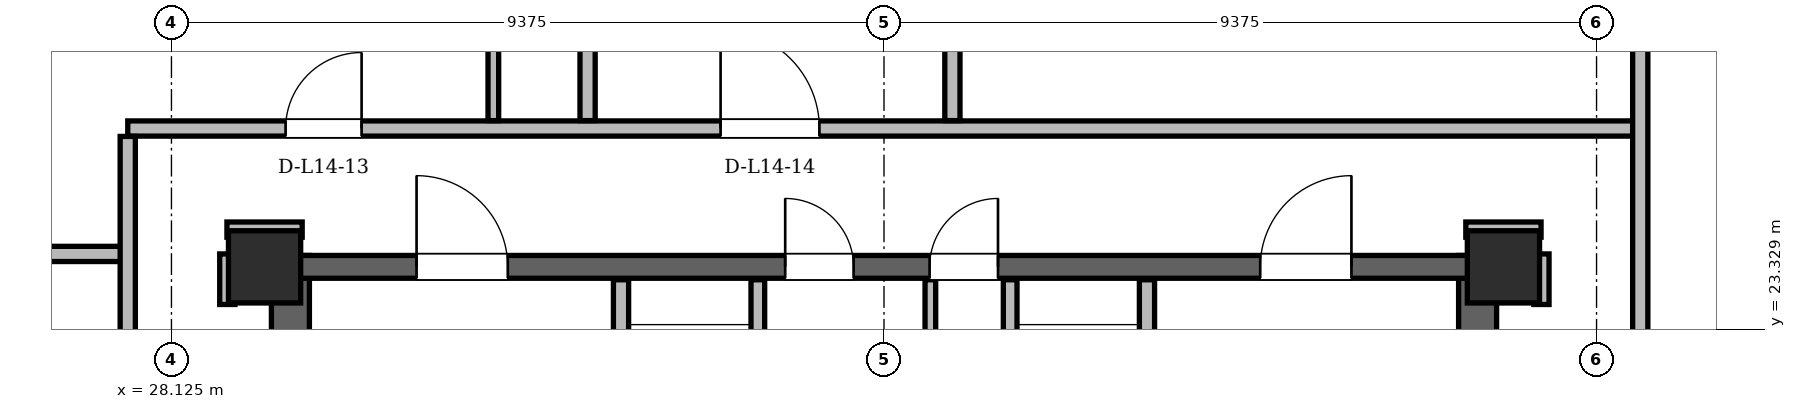
"""IFC4 building model, lengths in metres.
Left out: names, types, materials, properties, quantities, classifications, styles, units other than length and angle.
Written with IfcOpenShell. Run it as: python <this file> out.ifc"""

import sys

from ifc_helpers import new_model, si_unit, direction, frame, frame_2d, origin, origin_2d, place, context, subcontext, project, spatial, rectangle, hollow_rectangle, extrude, element, fill, save


model = new_model("IFC4")
c1 = context("Model", 3, precision=1e-05, world=origin(), true_north=direction((0.0, 1.0)))
c2 = subcontext(c1, "Body", "Model", "MODEL_VIEW")
j1 = project(units=[si_unit("LENGTHUNIT", "METRE"), si_unit("PLANEANGLEUNIT", "RADIAN")], contexts=[c1])
p1 = place(None, origin())
s1 = spatial("IfcSite", under=j1, at=p1, CompositionType="ELEMENT")
p2 = place(p1, origin())
s2 = spatial("IfcBuilding", under=s1, at=p2, CompositionType="ELEMENT")
p3 = place(p2, frame((0.0, 0.0, 56.1)))
s3 = spatial("IfcBuildingStorey", under=s2, at=p3, CompositionType="ELEMENT", Elevation=56.1)
for number, where, z_axis, x_axis in (
    (1, (45.65, 24.15, 0.0), (0.0, 0.0, 1.0), (1.0, 0.0, 0.0)),
    (2, (29.35, 24.15, 0.0), (0.0, 0.0, 1.0), (1.0, 0.0, 0.0)),
):
    element("IfcColumn", number, at=place(p3, frame(where, z_axis=z_axis, x_axis=x_axis)), inside=s3, PredefinedType="COLUMN", context=c2, shape_type="SweptSolid", body=[
        extrude(hollow_rectangle(XDim=0.95, YDim=0.95, WallThickness=0.08, at=origin_2d()), origin(), (0.0, 0.0, 1.0), 3.6),
    ])
for number, where, z_axis, x_axis in (
    (3, (29.69, 11.0, 0.0), (0.0, 0.0, 1.0), (0.0, 1.0, 0.0)),
    (4, (45.31, 11.0, 0.0), (0.0, 0.0, 1.0), (0.0, 1.0, 0.0)),
):
    element("IfcWall", number, at=place(p3, frame(where, z_axis=z_axis, x_axis=x_axis)), inside=s3, PredefinedType="SHEAR", context=c2, shape_type="SweptSolid", body=[
        extrude(rectangle(XDim=13.3, YDim=0.5, at=frame_2d((6.65, 0.0))), origin(), (0.0, 0.0, 1.0), 3.36),
    ])
p4 = place(p3, frame((29.65, 24.15, 0.0), z_axis=(0.0, 0.0, 1.0), x_axis=(1.0, 0.0, 0.0)))
e5 = element("IfcWall", 5, at=p4, inside=s3, PredefinedType="SHEAR", context=c2, shape_type="SweptSolid", body=[
    extrude(rectangle(XDim=15.7, YDim=0.3, at=frame_2d((7.85, 0.0))), origin(), (0.0, 0.0, 1.0), 3.36),
])
p5 = place(p4, frame((1.7, 0.0, 0.0)))
e6 = element("IfcOpeningElement", 6, at=p5, cuts=e5, PredefinedType="OPENING", context=c2, shape_type="SweptSolid", body=[
    extrude(rectangle(XDim=1.2, YDim=2.2, at=frame_2d((0.6, 1.1))), frame((0.0, 0.15, 0.0), z_axis=(0.0, -1.0, 0.0), x_axis=(1.0, 0.0, 0.0)), (0.0, 0.0, 1.0), 0.3),
])
p6 = place(p4, frame((12.8, 0.0, 0.0)))
e7 = element("IfcOpeningElement", 7, at=p6, cuts=e5, PredefinedType="OPENING", context=c2, shape_type="SweptSolid", body=[
    extrude(rectangle(XDim=1.2, YDim=2.2, at=frame_2d((0.6, 1.1))), frame((0.0, 0.15, 0.0), z_axis=(0.0, -1.0, 0.0), x_axis=(1.0, 0.0, 0.0)), (0.0, 0.0, 1.0), 0.3),
])
p7 = place(p4, frame((6.55, 0.0, 0.0)))
e8 = element("IfcOpeningElement", 8, at=p7, cuts=e5, PredefinedType="OPENING", context=c2, shape_type="SweptSolid", body=[
    extrude(rectangle(XDim=0.9, YDim=2.05, at=frame_2d((0.45, 1.025))), frame((0.0, 0.15, 0.0), z_axis=(0.0, -1.0, 0.0), x_axis=(1.0, 0.0, 0.0)), (0.0, 0.0, 1.0), 0.3),
])
p8 = place(p4, frame((8.45, 0.0, 0.0)))
e9 = element("IfcOpeningElement", 9, at=p8, cuts=e5, PredefinedType="OPENING", context=c2, shape_type="SweptSolid", body=[
    extrude(rectangle(XDim=0.9, YDim=2.05, at=frame_2d((0.45, 1.025))), frame((0.0, 0.15, 0.0), z_axis=(0.0, -1.0, 0.0), x_axis=(1.0, 0.0, 0.0)), (0.0, 0.0, 1.0), 0.3),
])
p9 = place(p3, frame((61.396, 14.559, 0.0), z_axis=(0.0, 0.0, 1.0), x_axis=(-0.500002389912, 0.866024023964, 0.0)))
e10 = element("IfcWall", 10, at=p9, inside=s3, PredefinedType="SOLIDWALL", context=c2, shape_type="SweptSolid", body=[
    extrude(rectangle(XDim=33.494, YDim=0.34, at=frame_2d((16.747, 0.0))), origin(), (0.0, 0.0, 1.0), 2.494),
])
p10 = place(p9, frame((6.159, 0.0, 0.0)))
e11 = element("IfcOpeningElement", 11, at=p10, cuts=e10, PredefinedType="OPENING", context=c2, shape_type="SweptSolid", body=[
    extrude(rectangle(XDim=1.5, YDim=2.2, at=frame_2d((0.75, 1.1))), frame((0.0, 0.17, 0.0), z_axis=(0.0, -1.0, 0.0), x_axis=(1.0, 0.0, 0.0)), (0.0, 0.0, 1.0), 0.34),
])
p11 = place(p9, frame((24.379, 0.0, 0.0)))
e12 = element("IfcOpeningElement", 12, at=p11, cuts=e10, PredefinedType="OPENING", context=c2, shape_type="SweptSolid", body=[
    extrude(rectangle(XDim=1.5, YDim=2.2, at=frame_2d((0.75, 1.1))), frame((0.0, 0.17, 0.0), z_axis=(0.0, -1.0, 0.0), x_axis=(1.0, 0.0, 0.0)), (0.0, 0.0, 1.0), 0.34),
])
p12 = place(p9, frame((0.92, 0.0, 0.85)))
e13 = element("IfcOpeningElement", 13, at=p12, cuts=e10, PredefinedType="OPENING", context=c2, shape_type="SweptSolid", body=[
    extrude(rectangle(XDim=1.2, YDim=1.48, at=frame_2d((0.6, 0.74))), frame((0.0, 0.17, 0.0), z_axis=(0.0, -1.0, 0.0), x_axis=(1.0, 0.0, 0.0)), (0.0, 0.0, 1.0), 0.34),
])
p13 = place(p9, frame((10.928, 0.0, 0.85)))
e14 = element("IfcOpeningElement", 14, at=p13, cuts=e10, PredefinedType="OPENING", context=c2, shape_type="SweptSolid", body=[
    extrude(rectangle(XDim=1.6, YDim=1.534, at=frame_2d((0.8, 0.767))), frame((0.0, 0.17, 0.0), z_axis=(0.0, -1.0, 0.0), x_axis=(1.0, 0.0, 0.0)), (0.0, 0.0, 1.0), 0.34),
])
p14 = place(p9, frame((18.529, 0.0, 0.85)))
e15 = element("IfcOpeningElement", 15, at=p14, cuts=e10, PredefinedType="OPENING", context=c2, shape_type="SweptSolid", body=[
    extrude(rectangle(XDim=3.0, YDim=1.534, at=frame_2d((1.5, 0.767))), frame((0.0, 0.17, 0.0), z_axis=(0.0, -1.0, 0.0), x_axis=(1.0, 0.0, 0.0)), (0.0, 0.0, 1.0), 0.34),
])
p15 = place(p9, frame((3.162, 0.0, 0.85)))
e16 = element("IfcOpeningElement", 16, at=p15, cuts=e10, PredefinedType="OPENING", context=c2, shape_type="SweptSolid", body=[
    extrude(rectangle(XDim=1.2, YDim=1.48, at=frame_2d((0.6, 0.74))), frame((0.0, 0.17, 0.0), z_axis=(0.0, -1.0, 0.0), x_axis=(1.0, 0.0, 0.0)), (0.0, 0.0, 1.0), 0.34),
])
p16 = place(p3, frame((30.351, 43.565, 0.0), z_axis=(0.0, 0.0, 1.0), x_axis=(-0.500002389912, -0.866024023964, 0.0)))
e17 = element("IfcWall", 17, at=p16, inside=s3, PredefinedType="SOLIDWALL", context=c2, shape_type="SweptSolid", body=[
    extrude(rectangle(XDim=33.494, YDim=0.34, at=frame_2d((16.747, 0.0))), origin(), (0.0, 0.0, 1.0), 2.494),
])
p17 = place(p16, frame((6.159, 0.0, 0.0)))
e18 = element("IfcOpeningElement", 18, at=p17, cuts=e17, PredefinedType="OPENING", context=c2, shape_type="SweptSolid", body=[
    extrude(rectangle(XDim=1.5, YDim=2.2, at=frame_2d((0.75, 1.1))), frame((0.0, 0.17, 0.0), z_axis=(0.0, -1.0, 0.0), x_axis=(1.0, 0.0, 0.0)), (0.0, 0.0, 1.0), 0.34),
])
p18 = place(p16, frame((24.379, 0.0, 0.0)))
e19 = element("IfcOpeningElement", 19, at=p18, cuts=e17, PredefinedType="OPENING", context=c2, shape_type="SweptSolid", body=[
    extrude(rectangle(XDim=1.5, YDim=2.2, at=frame_2d((0.75, 1.1))), frame((0.0, 0.17, 0.0), z_axis=(0.0, -1.0, 0.0), x_axis=(1.0, 0.0, 0.0)), (0.0, 0.0, 1.0), 0.34),
])
p19 = place(p16, frame((29.886, 0.0, 0.85)))
e20 = element("IfcOpeningElement", 20, at=p19, cuts=e17, PredefinedType="OPENING", context=c2, shape_type="SweptSolid", body=[
    extrude(rectangle(XDim=2.2, YDim=1.534, at=frame_2d((1.1, 0.767))), frame((0.0, 0.17, 0.0), z_axis=(0.0, -1.0, 0.0), x_axis=(1.0, 0.0, 0.0)), (0.0, 0.0, 1.0), 0.34),
])
p20 = place(p16, frame((1.32, 0.0, 0.85)))
e21 = element("IfcOpeningElement", 21, at=p20, cuts=e17, PredefinedType="OPENING", context=c2, shape_type="SweptSolid", body=[
    extrude(rectangle(XDim=2.6, YDim=1.534, at=frame_2d((1.3, 0.767))), frame((0.0, 0.17, 0.0), z_axis=(0.0, -1.0, 0.0), x_axis=(1.0, 0.0, 0.0)), (0.0, 0.0, 1.0), 0.34),
])
p21 = place(p16, frame((16.806, 0.0, 0.85)))
e22 = element("IfcOpeningElement", 22, at=p21, cuts=e17, PredefinedType="OPENING", context=c2, shape_type="SweptSolid", body=[
    extrude(rectangle(XDim=2.0, YDim=1.534, at=frame_2d((1.0, 0.767))), frame((0.0, 0.17, 0.0), z_axis=(0.0, -1.0, 0.0), x_axis=(1.0, 0.0, 0.0)), (0.0, 0.0, 1.0), 0.34),
])
p22 = place(p3, frame((34.04, 19.48, 0.0), z_axis=(0.0, 0.0, 1.0), x_axis=(0.0, 1.0, 0.0)))
e23 = element("IfcWall", 23, at=p22, inside=s3, PredefinedType="PARTITIONING", context=c2, shape_type="SweptSolid", body=[
    extrude(rectangle(XDim=4.5, YDim=0.2, at=frame_2d((2.25, 0.0))), origin(), (0.0, 0.0, 1.0), 2.4),
])
p23 = place(p22, frame((2.12, 0.0, 0.0)))
e24 = element("IfcOpeningElement", 24, at=p23, cuts=e23, PredefinedType="OPENING", context=c2, shape_type="SweptSolid", body=[
    extrude(rectangle(XDim=1.1, YDim=2.2, at=frame_2d((0.55, 1.1))), frame((0.0, 0.1, 0.0), z_axis=(0.0, -1.0, 0.0), x_axis=(1.0, 0.0, 0.0)), (0.0, 0.0, 1.0), 0.2),
])
p24 = place(p3, frame((35.84, 20.96, 0.0), z_axis=(0.0, 0.0, 1.0), x_axis=(0.0, 1.0, 0.0)))
e25 = element("IfcWall", 25, at=p24, inside=s3, PredefinedType="PARTITIONING", context=c2, shape_type="SweptSolid", body=[
    extrude(rectangle(XDim=3.02, YDim=0.18, at=frame_2d((1.51, 0.0))), origin(), (0.0, 0.0, 1.0), 2.4),
])
p25 = place(p3, frame((40.96, 19.48, 0.0), z_axis=(0.0, 0.0, 1.0), x_axis=(0.0, 1.0, 0.0)))
e26 = element("IfcWall", 26, at=p25, inside=s3, PredefinedType="PARTITIONING", context=c2, shape_type="SweptSolid", body=[
    extrude(rectangle(XDim=4.5, YDim=0.2, at=frame_2d((2.25, 0.0))), origin(), (0.0, 0.0, 1.0), 2.4),
])
p26 = place(p25, frame((2.12, 0.0, 0.0)))
e27 = element("IfcOpeningElement", 27, at=p26, cuts=e26, PredefinedType="OPENING", context=c2, shape_type="SweptSolid", body=[
    extrude(rectangle(XDim=1.1, YDim=2.2, at=frame_2d((0.55, 1.1))), frame((0.0, 0.1, 0.0), z_axis=(0.0, -1.0, 0.0), x_axis=(1.0, 0.0, 0.0)), (0.0, 0.0, 1.0), 0.2),
])
p27 = place(p3, frame((39.16, 20.96, 0.0), z_axis=(0.0, 0.0, 1.0), x_axis=(0.0, 1.0, 0.0)))
e28 = element("IfcWall", 28, at=p27, inside=s3, PredefinedType="PARTITIONING", context=c2, shape_type="SweptSolid", body=[
    extrude(rectangle(XDim=3.02, YDim=0.18, at=frame_2d((1.51, 0.0))), origin(), (0.0, 0.0, 1.0), 2.4),
])
p28 = place(p3, frame((38.11, 21.06, 0.0), z_axis=(0.0, 0.0, 1.0), x_axis=(0.0, 1.0, 0.0)))
e29 = element("IfcWall", 29, at=p28, inside=s3, PredefinedType="PARTITIONING", context=c2, shape_type="SweptSolid", body=[
    extrude(rectangle(XDim=2.92, YDim=0.14, at=frame_2d((1.46, 0.0))), origin(), (0.0, 0.0, 1.0), 2.4),
])
p29 = place(p3, frame((19.441, 24.32, 0.0), z_axis=(0.0, 0.0, 1.0), x_axis=(1.0, 0.0, 0.0)))
e30 = element("IfcWall", 30, at=p29, inside=s3, PredefinedType="PARTITIONING", context=c2, shape_type="SweptSolid", body=[
    extrude(rectangle(XDim=8.109, YDim=0.2, at=frame_2d((4.055, 0.0))), origin(), (0.0, 0.0, 1.0), 2.494),
])
for number, where, z_axis, x_axis in (
    (31, (28.855, 24.64, 0.0), (0.0, 0.0, 1.0), (1.0, 0.0, 0.0)),
    (32, (45.155, 24.64, 0.0), (0.0, 0.0, 1.0), (1.0, 0.0, 0.0)),
):
    element("IfcWall", number, at=place(p3, frame(where, z_axis=z_axis, x_axis=x_axis)), inside=s3, PredefinedType="PARTITIONING", context=c2, shape_type="SweptSolid", body=[
        extrude(rectangle(XDim=0.99, YDim=0.2, at=frame_2d((0.495, 0.0))), origin(), (0.0, 0.0, 1.0), 2.738),
    ])
p30 = place(p3, frame((27.55, 25.97, 0.0), z_axis=(0.0, 0.0, 1.0), x_axis=(1.0, 0.0, 0.0)))
e33 = element("IfcWall", 33, at=p30, inside=s3, PredefinedType="PARTITIONING", context=c2, shape_type="SweptSolid", body=[
    extrude(rectangle(XDim=19.9, YDim=0.2, at=frame_2d((9.95, 0.0))), origin(), (0.0, 0.0, 1.0), 2.738),
])
p31 = place(p30, frame((2.077, 0.0, 0.0)))
e34 = element("IfcOpeningElement", 34, at=p31, cuts=e33, PredefinedType="OPENING", context=c2, shape_type="SweptSolid", body=[
    extrude(rectangle(XDim=1.0, YDim=2.18, at=frame_2d((0.5, 1.09))), frame((0.0, 0.1, 0.0), z_axis=(0.0, -1.0, 0.0), x_axis=(1.0, 0.0, 0.0)), (0.0, 0.0, 1.0), 0.2),
])
p32 = place(p30, frame((7.8, 0.0, 0.0)))
e35 = element("IfcOpeningElement", 35, at=p32, cuts=e33, PredefinedType="OPENING", context=c2, shape_type="SweptSolid", body=[
    extrude(rectangle(XDim=1.3, YDim=2.2, at=frame_2d((0.65, 1.1))), frame((0.0, 0.1, 0.0), z_axis=(0.0, -1.0, 0.0), x_axis=(1.0, 0.0, 0.0)), (0.0, 0.0, 1.0), 0.2),
])
p33 = place(p3, frame((27.55, 11.054, 0.0), z_axis=(0.0, 0.0, 1.0), x_axis=(0.0, 1.0, 0.0)))
e36 = element("IfcWall", 36, at=p33, inside=s3, PredefinedType="PARTITIONING", context=c2, shape_type="SweptSolid", body=[
    extrude(rectangle(XDim=14.812, YDim=0.2, at=frame_2d((7.406, 0.0))), origin(), (0.0, 0.0, 1.0), 2.738),
])
p34 = place(p33, frame((7.932, 0.0, 0.0)))
e37 = element("IfcOpeningElement", 37, at=p34, cuts=e36, PredefinedType="OPENING", context=c2, shape_type="SweptSolid", body=[
    extrude(rectangle(XDim=1.0, YDim=2.18, at=frame_2d((0.5, 1.09))), frame((0.0, 0.1, 0.0), z_axis=(0.0, -1.0, 0.0), x_axis=(1.0, 0.0, 0.0)), (0.0, 0.0, 1.0), 0.2),
])
p35 = place(p3, frame((28.86, 23.655, 0.0), z_axis=(0.0, 0.0, 1.0), x_axis=(0.0, 1.0, 0.0)))
e38 = element("IfcWall", 38, at=p35, inside=s3, PredefinedType="PARTITIONING", context=c2, shape_type="SweptSolid", body=[
    extrude(rectangle(XDim=0.665, YDim=0.2, at=frame_2d((0.333, 0.0))), origin(), (0.0, 0.0, 1.0), 2.946),
])
p36 = place(p3, frame((32.36, 26.074, 0.0), z_axis=(0.0, 0.0, 1.0), x_axis=(0.0, 1.0, 0.0)))
e39 = element("IfcWall", 39, at=p36, inside=s3, PredefinedType="PARTITIONING", context=c2, shape_type="SweptSolid", body=[
    extrude(rectangle(XDim=17.317, YDim=0.14, at=frame_2d((8.659, 0.0))), origin(), (0.0, 0.0, 1.0), 3.36),
])
p37 = place(p36, frame((1.419, 0.0, 0.0)))
e40 = element("IfcOpeningElement", 40, at=p37, cuts=e39, PredefinedType="OPENING", context=c2, shape_type="SweptSolid", body=[
    extrude(rectangle(XDim=0.95, YDim=2.1, at=frame_2d((0.475, 1.05))), frame((0.0, 0.07, 0.0), z_axis=(0.0, -1.0, 0.0), x_axis=(1.0, 0.0, 0.0)), (0.0, 0.0, 1.0), 0.14),
])
p38 = place(p36, frame((5.356, 0.0, 0.0)))
e41 = element("IfcOpeningElement", 41, at=p38, cuts=e39, PredefinedType="OPENING", context=c2, shape_type="SweptSolid", body=[
    extrude(rectangle(XDim=0.92, YDim=2.12, at=frame_2d((0.46, 1.06))), frame((0.0, 0.07, 0.0), z_axis=(0.0, -1.0, 0.0), x_axis=(1.0, 0.0, 0.0)), (0.0, 0.0, 1.0), 0.14),
])
p39 = place(p36, frame((8.721, 0.0, 0.0)))
e42 = element("IfcOpeningElement", 42, at=p39, cuts=e39, PredefinedType="OPENING", context=c2, shape_type="SweptSolid", body=[
    extrude(rectangle(XDim=0.95, YDim=2.1, at=frame_2d((0.475, 1.05))), frame((0.0, 0.07, 0.0), z_axis=(0.0, -1.0, 0.0), x_axis=(1.0, 0.0, 0.0)), (0.0, 0.0, 1.0), 0.14),
])
p40 = place(p36, frame((11.561, 0.0, 0.0)))
e43 = element("IfcOpeningElement", 43, at=p40, cuts=e39, PredefinedType="OPENING", context=c2, shape_type="SweptSolid", body=[
    extrude(rectangle(XDim=0.95, YDim=2.1, at=frame_2d((0.475, 1.05))), frame((0.0, 0.07, 0.0), z_axis=(0.0, -1.0, 0.0), x_axis=(1.0, 0.0, 0.0)), (0.0, 0.0, 1.0), 0.14),
])
p41 = place(p36, frame((13.945, 0.0, 0.0)))
e44 = element("IfcOpeningElement", 44, at=p41, cuts=e39, PredefinedType="OPENING", context=c2, shape_type="SweptSolid", body=[
    extrude(rectangle(XDim=0.95, YDim=2.1, at=frame_2d((0.475, 1.05))), frame((0.0, 0.07, 0.0), z_axis=(0.0, -1.0, 0.0), x_axis=(1.0, 0.0, 0.0)), (0.0, 0.0, 1.0), 0.14),
])
p42 = place(p36, frame((15.971, 0.0, 0.0)))
e45 = element("IfcOpeningElement", 45, at=p42, cuts=e39, PredefinedType="OPENING", context=c2, shape_type="SweptSolid", body=[
    extrude(rectangle(XDim=0.88, YDim=2.08, at=frame_2d((0.44, 1.04))), frame((0.0, 0.07, 0.0), z_axis=(0.0, -1.0, 0.0), x_axis=(1.0, 0.0, 0.0)), (0.0, 0.0, 1.0), 0.14),
])
for number, where, z_axis, x_axis in (
    (46, (33.6, 26.074, 0.0), (0.0, 0.0, 1.0), (0.0, 1.0, 0.0)),
    (47, (38.4, 26.074, 0.0), (0.0, 0.0, 1.0), (0.0, 1.0, 0.0)),
):
    element("IfcWall", number, at=place(p3, frame(where, z_axis=z_axis, x_axis=x_axis)), inside=s3, PredefinedType="PARTITIONING", context=c2, shape_type="SweptSolid", body=[
        extrude(rectangle(XDim=4.292, YDim=0.2, at=frame_2d((2.146, 0.0))), origin(), (0.0, 0.0, 1.0), 3.36),
    ])
p43 = place(p3, frame((46.15, 23.655, 0.0), z_axis=(0.0, 0.0, 1.0), x_axis=(0.0, 1.0, 0.0)))
e48 = element("IfcWall", 48, at=p43, inside=s3, PredefinedType="PARTITIONING", context=c2, shape_type="SweptSolid", body=[
    extrude(rectangle(XDim=0.665, YDim=0.2, at=frame_2d((0.333, 0.0))), origin(), (0.0, 0.0, 1.0), 2.946),
])
p44 = place(p3, frame((47.45, 11.054, 0.0), z_axis=(0.0, 0.0, 1.0), x_axis=(0.0, 1.0, 0.0)))
e49 = element("IfcWall", 49, at=p44, inside=s3, PredefinedType="PARTITIONING", context=c2, shape_type="SweptSolid", body=[
    extrude(rectangle(XDim=27.312, YDim=0.2, at=frame_2d((13.656, 0.0))), origin(), (0.0, 0.0, 1.0), 2.494),
])
p45 = place(p44, frame((10.989, 0.0, 0.0)))
e50 = element("IfcOpeningElement", 50, at=p45, cuts=e49, PredefinedType="OPENING", context=c2, shape_type="SweptSolid", body=[
    extrude(rectangle(XDim=1.0, YDim=2.18, at=frame_2d((0.5, 1.09))), frame((0.0, 0.1, 0.0), z_axis=(0.0, -1.0, 0.0), x_axis=(1.0, 0.0, 0.0)), (0.0, 0.0, 1.0), 0.2),
])
p46 = place(p5, origin())
e51 = element("IfcDoor", 51, at=p46, inside=s3, OperationType="SINGLE_SWING_LEFT", PredefinedType="DOOR", context=c2, shape_type="SweptSolid", body=[
    extrude(rectangle(XDim=1.2, YDim=2.2, at=frame_2d((0.6, 1.1))), frame((0.0, 0.025, 0.0), z_axis=(0.0, -1.0, 0.0), x_axis=(1.0, 0.0, 0.0)), (0.0, 0.0, 1.0), 0.05),
])
fill(e6, e51)
p47 = place(p6, origin())
e52 = element("IfcDoor", 52, at=p47, inside=s3, OperationType="SINGLE_SWING_RIGHT", PredefinedType="DOOR", context=c2, shape_type="SweptSolid", body=[
    extrude(rectangle(XDim=1.2, YDim=2.2, at=frame_2d((0.6, 1.1))), frame((0.0, 0.025, 0.0), z_axis=(0.0, -1.0, 0.0), x_axis=(1.0, 0.0, 0.0)), (0.0, 0.0, 1.0), 0.05),
])
fill(e7, e52)
p48 = place(p7, origin())
e53 = element("IfcDoor", 53, at=p48, inside=s3, OperationType="SINGLE_SWING_LEFT", PredefinedType="DOOR", context=c2, shape_type="SweptSolid", body=[
    extrude(rectangle(XDim=0.9, YDim=2.05, at=frame_2d((0.45, 1.025))), frame((0.0, 0.025, 0.0), z_axis=(0.0, -1.0, 0.0), x_axis=(1.0, 0.0, 0.0)), (0.0, 0.0, 1.0), 0.05),
])
fill(e8, e53)
p49 = place(p8, origin())
e54 = element("IfcDoor", 54, at=p49, inside=s3, OperationType="SINGLE_SWING_RIGHT", PredefinedType="DOOR", context=c2, shape_type="SweptSolid", body=[
    extrude(rectangle(XDim=0.9, YDim=2.05, at=frame_2d((0.45, 1.025))), frame((0.0, 0.025, 0.0), z_axis=(0.0, -1.0, 0.0), x_axis=(1.0, 0.0, 0.0)), (0.0, 0.0, 1.0), 0.05),
])
fill(e9, e54)
p50 = place(p31, origin())
e55 = element("IfcDoor", 55, at=p50, inside=s3, OperationType="SINGLE_SWING_RIGHT", PredefinedType="DOOR", context=c2, shape_type="SweptSolid", body=[
    extrude(rectangle(XDim=1.0, YDim=2.18, at=frame_2d((0.5, 1.09))), frame((0.0, 0.025, 0.0), z_axis=(0.0, -1.0, 0.0), x_axis=(1.0, 0.0, 0.0)), (0.0, 0.0, 1.0), 0.05),
])
fill(e34, e55)
p51 = place(p32, origin())
e56 = element("IfcDoor", 56, at=p51, inside=s3, OperationType="SINGLE_SWING_LEFT", PredefinedType="DOOR", context=c2, shape_type="SweptSolid", body=[
    extrude(rectangle(XDim=1.3, YDim=2.2, at=frame_2d((0.65, 1.1))), frame((0.0, 0.025, 0.0), z_axis=(0.0, -1.0, 0.0), x_axis=(1.0, 0.0, 0.0)), (0.0, 0.0, 1.0), 0.05),
])
fill(e35, e56)
save(model, sys.argv[1])
